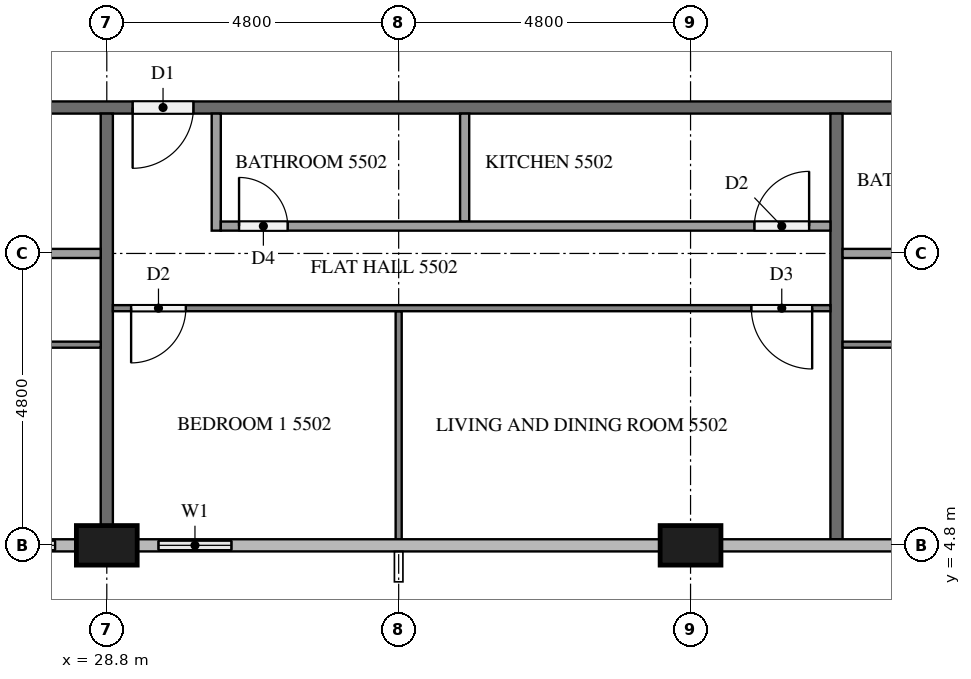
"""IFC4 building model, lengths in metres.
Left out: names, types, materials, properties, quantities, classifications, styles, units other than length and angle.
Written with IfcOpenShell. Run it as: python <this file> out.ifc"""

import sys

from ifc_helpers import new_model, si_unit, direction, frame, frame_2d, origin, origin_2d, place, context, subcontext, project, spatial, rectangle, extrude, element, fill, save


model = new_model("IFC4")
c1 = context("Model", 3, precision=1e-05, world=origin(), true_north=direction((0.0, 1.0)))
c2 = subcontext(c1, "Body", "Model", "MODEL_VIEW")
j1 = project(units=[si_unit("LENGTHUNIT", "METRE"), si_unit("PLANEANGLEUNIT", "RADIAN")], contexts=[c1])
p1 = place(None, origin())
s1 = spatial("IfcSite", under=j1, at=p1, CompositionType="ELEMENT")
p2 = place(p1, origin())
s2 = spatial("IfcBuilding", under=s1, at=p2, CompositionType="ELEMENT")
p3 = place(p2, frame((0.0, 0.0, 212.3)))
s3 = spatial("IfcBuildingStorey", under=s2, at=p3, CompositionType="ELEMENT", Elevation=212.3)
for number, where, z_axis, x_axis in (
    (1, (28.8, 4.8, 0.0), (0.0, 0.0, 1.0), (1.0, 0.0, 0.0)),
    (2, (38.4, 4.8, 0.0), (0.0, 0.0, 1.0), (1.0, 0.0, 0.0)),
):
    element("IfcColumn", number, at=place(p3, frame(where, z_axis=z_axis, x_axis=x_axis)), inside=s3, PredefinedType="COLUMN", context=c2, shape_type="SweptSolid", body=[
        extrude(rectangle(XDim=1.0, YDim=0.65, at=origin_2d()), origin(), (0.0, 0.0, 1.0), 3.2),
    ])
p4 = place(p3, frame((26.4, 4.8, 0.0), z_axis=(0.0, 0.0, 1.0), x_axis=(1.0, 0.0, 0.0)))
e3 = element("IfcWall", 3, at=p4, inside=s3, PredefinedType="SOLIDWALL", context=c2, shape_type="SweptSolid", body=[
    extrude(rectangle(XDim=1.9, YDim=0.15, at=frame_2d((0.95, 0.0))), origin(), (0.0, 0.0, 1.0), 3.2),
])
p5 = place(p4, frame((0.35, 0.0, 0.9)))
e4 = element("IfcOpeningElement", 4, at=p5, cuts=e3, PredefinedType="OPENING", context=c2, shape_type="SweptSolid", body=[
    extrude(rectangle(XDim=1.2, YDim=1.4, at=frame_2d((0.6, 0.7))), frame((0.0, 0.085, 0.0), z_axis=(0.0, -1.0, 0.0), x_axis=(1.0, 0.0, 0.0)), (0.0, 0.0, 1.0), 0.17),
])
p6 = place(p3, frame((29.3, 4.8, 0.0), z_axis=(0.0, 0.0, 1.0), x_axis=(1.0, 0.0, 0.0)))
e5 = element("IfcWall", 5, at=p6, inside=s3, PredefinedType="SOLIDWALL", context=c2, shape_type="SweptSolid", body=[
    extrude(rectangle(XDim=1.9, YDim=0.15, at=frame_2d((0.95, 0.0))), origin(), (0.0, 0.0, 1.0), 3.2),
])
p7 = place(p6, frame((0.35, 0.0, 0.9)))
e6 = element("IfcOpeningElement", 6, at=p7, cuts=e5, PredefinedType="OPENING", context=c2, shape_type="SweptSolid", body=[
    extrude(rectangle(XDim=1.2, YDim=1.4, at=frame_2d((0.6, 0.7))), frame((0.0, 0.085, 0.0), z_axis=(0.0, -1.0, 0.0), x_axis=(1.0, 0.0, 0.0)), (0.0, 0.0, 1.0), 0.17),
])
p8 = place(p3, frame((50.5, 12.0, 0.0), z_axis=(0.0, 0.0, 1.0), x_axis=(-1.0, 0.0, 0.0)))
e7 = element("IfcWall", 7, at=p8, inside=s3, PredefinedType="PARTITIONING", context=c2, shape_type="SweptSolid", body=[
    extrude(rectangle(XDim=38.6, YDim=0.2, at=frame_2d((19.3, 0.0))), origin(), (0.0, 0.0, 1.0), 3.2),
])
p9 = place(p8, frame((37.075, 0.0, 0.0)))
e8 = element("IfcOpeningElement", 8, at=p9, cuts=e7, PredefinedType="OPENING", context=c2, shape_type="SweptSolid", body=[
    extrude(rectangle(XDim=1.0, YDim=2.1, at=frame_2d((0.5, 1.05))), frame((0.0, 0.11, 0.0), z_axis=(0.0, -1.0, 0.0), x_axis=(1.0, 0.0, 0.0)), (0.0, 0.0, 1.0), 0.22),
])
p10 = place(p8, frame((20.275, 0.0, 0.0)))
e9 = element("IfcOpeningElement", 9, at=p10, cuts=e7, PredefinedType="OPENING", context=c2, shape_type="SweptSolid", body=[
    extrude(rectangle(XDim=1.0, YDim=2.1, at=frame_2d((0.5, 1.05))), frame((0.0, 0.11, 0.0), z_axis=(0.0, -1.0, 0.0), x_axis=(1.0, 0.0, 0.0)), (0.0, 0.0, 1.0), 0.22),
])
p11 = place(p8, frame((0.525, 0.0, 0.0)))
e10 = element("IfcOpeningElement", 10, at=p11, cuts=e7, PredefinedType="OPENING", context=c2, shape_type="SweptSolid", body=[
    extrude(rectangle(XDim=1.0, YDim=2.1, at=frame_2d((0.5, 1.05))), frame((0.0, 0.11, 0.0), z_axis=(0.0, -1.0, 0.0), x_axis=(1.0, 0.0, 0.0)), (0.0, 0.0, 1.0), 0.22),
])
p12 = place(p3, frame((28.8, 11.9, 0.0), z_axis=(0.0, 0.0, 1.0), x_axis=(0.0, -1.0, 0.0)))
e11 = element("IfcWall", 11, at=p12, inside=s3, PredefinedType="PARTITIONING", context=c2, shape_type="SweptSolid", body=[
    extrude(rectangle(XDim=6.775, YDim=0.2, at=frame_2d((3.387, 0.0))), origin(), (0.0, 0.0, 1.0), 3.2),
])
p13 = place(p3, frame((40.8, 11.9, 0.0), z_axis=(0.0, 0.0, 1.0), x_axis=(0.0, -1.0, 0.0)))
e12 = element("IfcWall", 12, at=p13, inside=s3, PredefinedType="PARTITIONING", context=c2, shape_type="SweptSolid", body=[
    extrude(rectangle(XDim=7.0, YDim=0.2, at=frame_2d((3.5, 0.0))), origin(), (0.0, 0.0, 1.0), 3.2),
])
p14 = place(p3, frame((28.7, 8.1, 0.0), z_axis=(0.0, 0.0, 1.0), x_axis=(-1.0, 0.0, 0.0)))
e13 = element("IfcWall", 13, at=p14, inside=s3, PredefinedType="PARTITIONING", context=c2, shape_type="SweptSolid", body=[
    extrude(rectangle(XDim=16.6, YDim=0.1, at=frame_2d((8.3, 0.0))), origin(), (0.0, 0.0, 1.0), 3.2),
])
p15 = place(p14, frame((15.4, 0.0, 0.0)))
e14 = element("IfcOpeningElement", 14, at=p15, cuts=e13, PredefinedType="OPENING", context=c2, shape_type="SweptSolid", body=[
    extrude(rectangle(XDim=0.9, YDim=2.1, at=frame_2d((0.45, 1.05))), frame((0.0, 0.06, 0.0), z_axis=(0.0, -1.0, 0.0), x_axis=(1.0, 0.0, 0.0)), (0.0, 0.0, 1.0), 0.12),
])
p16 = place(p14, frame((5.05, 0.0, 0.0)))
e15 = element("IfcOpeningElement", 15, at=p16, cuts=e13, PredefinedType="OPENING", context=c2, shape_type="SweptSolid", body=[
    extrude(rectangle(XDim=1.0, YDim=2.1, at=frame_2d((0.5, 1.05))), frame((0.0, 0.06, 0.0), z_axis=(0.0, -1.0, 0.0), x_axis=(1.0, 0.0, 0.0)), (0.0, 0.0, 1.0), 0.12),
])
p17 = place(p14, frame((3.45, 0.0, 0.0)))
e16 = element("IfcOpeningElement", 16, at=p17, cuts=e13, PredefinedType="OPENING", context=c2, shape_type="SweptSolid", body=[
    extrude(rectangle(XDim=0.9, YDim=2.1, at=frame_2d((0.45, 1.05))), frame((0.0, 0.06, 0.0), z_axis=(0.0, -1.0, 0.0), x_axis=(1.0, 0.0, 0.0)), (0.0, 0.0, 1.0), 0.12),
])
p18 = place(p3, frame((13.875, 9.6, 0.0), z_axis=(0.0, 0.0, 1.0), x_axis=(1.0, 0.0, 0.0)))
e17 = element("IfcWall", 17, at=p18, inside=s3, PredefinedType="PARTITIONING", context=c2, shape_type="SweptSolid", body=[
    extrude(rectangle(XDim=14.825, YDim=0.15, at=frame_2d((7.413, 0.0))), origin(), (0.0, 0.0, 1.0), 3.2),
])
p19 = place(p18, frame((0.3, 0.0, 0.0)))
e18 = element("IfcOpeningElement", 18, at=p19, cuts=e17, PredefinedType="OPENING", context=c2, shape_type="SweptSolid", body=[
    extrude(rectangle(XDim=0.9, YDim=2.1, at=frame_2d((0.45, 1.05))), frame((0.0, 0.085, 0.0), z_axis=(0.0, -1.0, 0.0), x_axis=(1.0, 0.0, 0.0)), (0.0, 0.0, 1.0), 0.17),
])
p20 = place(p18, frame((9.138, 0.0, 0.0)))
e19 = element("IfcOpeningElement", 19, at=p20, cuts=e17, PredefinedType="OPENING", context=c2, shape_type="SweptSolid", body=[
    extrude(rectangle(XDim=0.8, YDim=2.1, at=frame_2d((0.4, 1.05))), frame((0.0, 0.085, 0.0), z_axis=(0.0, -1.0, 0.0), x_axis=(1.0, 0.0, 0.0)), (0.0, 0.0, 1.0), 0.17),
])
p21 = place(p18, frame((10.588, 0.0, 0.0)))
e20 = element("IfcOpeningElement", 20, at=p21, cuts=e17, PredefinedType="OPENING", context=c2, shape_type="SweptSolid", body=[
    extrude(rectangle(XDim=0.9, YDim=2.1, at=frame_2d((0.45, 1.05))), frame((0.0, 0.085, 0.0), z_axis=(0.0, -1.0, 0.0), x_axis=(1.0, 0.0, 0.0)), (0.0, 0.0, 1.0), 0.17),
])
p22 = place(p3, frame((33.6, 8.65, 0.0), z_axis=(0.0, 0.0, 1.0), x_axis=(0.0, -1.0, 0.0)))
e21 = element("IfcWall", 21, at=p22, inside=s3, PredefinedType="PARTITIONING", context=c2, shape_type="SweptSolid", body=[
    extrude(rectangle(XDim=3.75, YDim=0.1, at=frame_2d((1.875, 0.0))), origin(), (0.0, 0.0, 1.0), 3.2),
])
p23 = place(p3, frame((40.7, 8.7, 0.0), z_axis=(0.0, 0.0, 1.0), x_axis=(-1.0, 0.0, 0.0)))
e22 = element("IfcWall", 22, at=p23, inside=s3, PredefinedType="PARTITIONING", context=c2, shape_type="SweptSolid", body=[
    extrude(rectangle(XDim=11.8, YDim=0.1, at=frame_2d((5.9, 0.0))), origin(), (0.0, 0.0, 1.0), 3.2),
])
p24 = place(p23, frame((10.6, 0.0, 0.0)))
e23 = element("IfcOpeningElement", 23, at=p24, cuts=e22, PredefinedType="OPENING", context=c2, shape_type="SweptSolid", body=[
    extrude(rectangle(XDim=0.9, YDim=2.1, at=frame_2d((0.45, 1.05))), frame((0.0, 0.06, 0.0), z_axis=(0.0, -1.0, 0.0), x_axis=(1.0, 0.0, 0.0)), (0.0, 0.0, 1.0), 0.12),
])
p25 = place(p23, frame((0.3, 0.0, 0.0)))
e24 = element("IfcOpeningElement", 24, at=p25, cuts=e22, PredefinedType="OPENING", context=c2, shape_type="SweptSolid", body=[
    extrude(rectangle(XDim=1.0, YDim=2.1, at=frame_2d((0.5, 1.05))), frame((0.0, 0.06, 0.0), z_axis=(0.0, -1.0, 0.0), x_axis=(1.0, 0.0, 0.0)), (0.0, 0.0, 1.0), 0.12),
])
p26 = place(p3, frame((34.685, 11.9, 0.0), z_axis=(0.0, 0.0, 1.0), x_axis=(0.0, -1.0, 0.0)))
e25 = element("IfcWall", 25, at=p26, inside=s3, PredefinedType="PARTITIONING", context=c2, shape_type="SweptSolid", body=[
    extrude(rectangle(XDim=1.775, YDim=0.15, at=frame_2d((0.887, 0.0))), origin(), (0.0, 0.0, 1.0), 3.2),
])
p27 = place(p3, frame((30.6, 11.9, 0.0), z_axis=(0.0, 0.0, 1.0), x_axis=(0.0, -1.0, 0.0)))
e26 = element("IfcWall", 26, at=p27, inside=s3, PredefinedType="PARTITIONING", context=c2, shape_type="SweptSolid", body=[
    extrude(rectangle(XDim=1.925, YDim=0.15, at=frame_2d((0.962, 0.0))), origin(), (0.0, 0.0, 1.0), 3.2),
])
p28 = place(p3, frame((30.675, 10.05, 0.0), z_axis=(0.0, 0.0, 1.0), x_axis=(1.0, 0.0, 0.0)))
e27 = element("IfcWall", 27, at=p28, inside=s3, PredefinedType="PARTITIONING", context=c2, shape_type="SweptSolid", body=[
    extrude(rectangle(XDim=10.025, YDim=0.15, at=frame_2d((5.012, 0.0))), origin(), (0.0, 0.0, 1.0), 3.2),
])
p29 = place(p28, frame((0.3, 0.0, 0.0)))
e28 = element("IfcOpeningElement", 28, at=p29, cuts=e27, PredefinedType="OPENING", context=c2, shape_type="SweptSolid", body=[
    extrude(rectangle(XDim=0.8, YDim=2.1, at=frame_2d((0.4, 1.05))), frame((0.0, 0.085, 0.0), z_axis=(0.0, -1.0, 0.0), x_axis=(1.0, 0.0, 0.0)), (0.0, 0.0, 1.0), 0.17),
])
p30 = place(p28, frame((8.775, 0.0, 0.0)))
e29 = element("IfcOpeningElement", 29, at=p30, cuts=e27, PredefinedType="OPENING", context=c2, shape_type="SweptSolid", body=[
    extrude(rectangle(XDim=0.9, YDim=2.1, at=frame_2d((0.45, 1.05))), frame((0.0, 0.085, 0.0), z_axis=(0.0, -1.0, 0.0), x_axis=(1.0, 0.0, 0.0)), (0.0, 0.0, 1.0), 0.17),
])
p31 = place(p3, frame((50.3, 8.1, 0.0), z_axis=(0.0, 0.0, 1.0), x_axis=(-1.0, 0.0, 0.0)))
e30 = element("IfcWall", 30, at=p31, inside=s3, PredefinedType="PARTITIONING", context=c2, shape_type="SweptSolid", body=[
    extrude(rectangle(XDim=9.4, YDim=0.1, at=frame_2d((4.7, 0.0))), origin(), (0.0, 0.0, 1.0), 3.2),
])
p32 = place(p31, frame((3.35, 0.0, 0.0)))
e31 = element("IfcOpeningElement", 31, at=p32, cuts=e30, PredefinedType="OPENING", context=c2, shape_type="SweptSolid", body=[
    extrude(rectangle(XDim=1.0, YDim=2.1, at=frame_2d((0.5, 1.05))), frame((0.0, 0.06, 0.0), z_axis=(0.0, -1.0, 0.0), x_axis=(1.0, 0.0, 0.0)), (0.0, 0.0, 1.0), 0.12),
])
p33 = place(p31, frame((5.05, 0.0, 0.0)))
e32 = element("IfcOpeningElement", 32, at=p33, cuts=e30, PredefinedType="OPENING", context=c2, shape_type="SweptSolid", body=[
    extrude(rectangle(XDim=0.9, YDim=2.1, at=frame_2d((0.45, 1.05))), frame((0.0, 0.06, 0.0), z_axis=(0.0, -1.0, 0.0), x_axis=(1.0, 0.0, 0.0)), (0.0, 0.0, 1.0), 0.12),
])
p34 = place(p3, frame((40.9, 9.6, 0.0), z_axis=(0.0, 0.0, 1.0), x_axis=(1.0, 0.0, 0.0)))
e33 = element("IfcWall", 33, at=p34, inside=s3, PredefinedType="PARTITIONING", context=c2, shape_type="SweptSolid", body=[
    extrude(rectangle(XDim=7.625, YDim=0.15, at=frame_2d((3.812, 0.0))), origin(), (0.0, 0.0, 1.0), 3.2),
])
p35 = place(p34, frame((3.375, 0.0, 0.0)))
e34 = element("IfcOpeningElement", 34, at=p35, cuts=e33, PredefinedType="OPENING", context=c2, shape_type="SweptSolid", body=[
    extrude(rectangle(XDim=0.9, YDim=2.1, at=frame_2d((0.45, 1.05))), frame((0.0, 0.085, 0.0), z_axis=(0.0, -1.0, 0.0), x_axis=(1.0, 0.0, 0.0)), (0.0, 0.0, 1.0), 0.17),
])
p36 = place(p34, frame((1.925, 0.0, 0.0)))
e35 = element("IfcOpeningElement", 35, at=p36, cuts=e33, PredefinedType="OPENING", context=c2, shape_type="SweptSolid", body=[
    extrude(rectangle(XDim=0.8, YDim=2.1, at=frame_2d((0.4, 1.05))), frame((0.0, 0.085, 0.0), z_axis=(0.0, -1.0, 0.0), x_axis=(1.0, 0.0, 0.0)), (0.0, 0.0, 1.0), 0.17),
])
p37 = place(p5, origin())
e36 = element("IfcWindow", 36, at=p37, inside=s3, PartitioningType="SINGLE_PANEL", PredefinedType="WINDOW", context=c2, shape_type="SweptSolid", body=[
    extrude(rectangle(XDim=1.2, YDim=1.4, at=frame_2d((0.6, 0.7))), frame((0.0, 0.03, 0.0), z_axis=(0.0, -1.0, 0.0), x_axis=(1.0, 0.0, 0.0)), (0.0, 0.0, 1.0), 0.06),
])
fill(e4, e36)
p38 = place(p7, origin())
e37 = element("IfcWindow", 37, at=p38, inside=s3, PartitioningType="SINGLE_PANEL", PredefinedType="WINDOW", context=c2, shape_type="SweptSolid", body=[
    extrude(rectangle(XDim=1.2, YDim=1.4, at=frame_2d((0.6, 0.7))), frame((0.0, 0.03, 0.0), z_axis=(0.0, -1.0, 0.0), x_axis=(1.0, 0.0, 0.0)), (0.0, 0.0, 1.0), 0.06),
])
fill(e6, e37)
p39 = place(p10, origin())
e38 = element("IfcDoor", 38, at=p39, inside=s3, OperationType="SINGLE_SWING_RIGHT", PredefinedType="DOOR", context=c2, shape_type="SweptSolid", body=[
    extrude(rectangle(XDim=1.0, YDim=2.1, at=frame_2d((0.5, 1.05))), frame((0.0, 0.025, 0.0), z_axis=(0.0, -1.0, 0.0), x_axis=(1.0, 0.0, 0.0)), (0.0, 0.0, 1.0), 0.05),
])
fill(e9, e38)
p40 = place(p24, origin())
e39 = element("IfcDoor", 39, at=p40, inside=s3, OperationType="SINGLE_SWING_RIGHT", PredefinedType="DOOR", context=c2, shape_type="SweptSolid", body=[
    extrude(rectangle(XDim=0.9, YDim=2.1, at=frame_2d((0.45, 1.05))), frame((0.0, 0.025, 0.0), z_axis=(0.0, -1.0, 0.0), x_axis=(1.0, 0.0, 0.0)), (0.0, 0.0, 1.0), 0.05),
])
fill(e23, e39)
p41 = place(p25, origin())
e40 = element("IfcDoor", 40, at=p41, inside=s3, OperationType="SINGLE_SWING_LEFT", PredefinedType="DOOR", context=c2, shape_type="SweptSolid", body=[
    extrude(rectangle(XDim=1.0, YDim=2.1, at=frame_2d((0.5, 1.05))), frame((0.0, 0.025, 0.0), z_axis=(0.0, -1.0, 0.0), x_axis=(1.0, 0.0, 0.0)), (0.0, 0.0, 1.0), 0.05),
])
fill(e24, e40)
p42 = place(p29, origin())
e41 = element("IfcDoor", 41, at=p42, inside=s3, OperationType="SINGLE_SWING_LEFT", PredefinedType="DOOR", context=c2, shape_type="SweptSolid", body=[
    extrude(rectangle(XDim=0.8, YDim=2.1, at=frame_2d((0.4, 1.05))), frame((0.0, 0.025, 0.0), z_axis=(0.0, -1.0, 0.0), x_axis=(1.0, 0.0, 0.0)), (0.0, 0.0, 1.0), 0.05),
])
fill(e28, e41)
p43 = place(p30, origin())
e42 = element("IfcDoor", 42, at=p43, inside=s3, OperationType="SINGLE_SWING_RIGHT", PredefinedType="DOOR", context=c2, shape_type="SweptSolid", body=[
    extrude(rectangle(XDim=0.9, YDim=2.1, at=frame_2d((0.45, 1.05))), frame((0.0, 0.025, 0.0), z_axis=(0.0, -1.0, 0.0), x_axis=(1.0, 0.0, 0.0)), (0.0, 0.0, 1.0), 0.05),
])
fill(e29, e42)
save(model, sys.argv[1])
